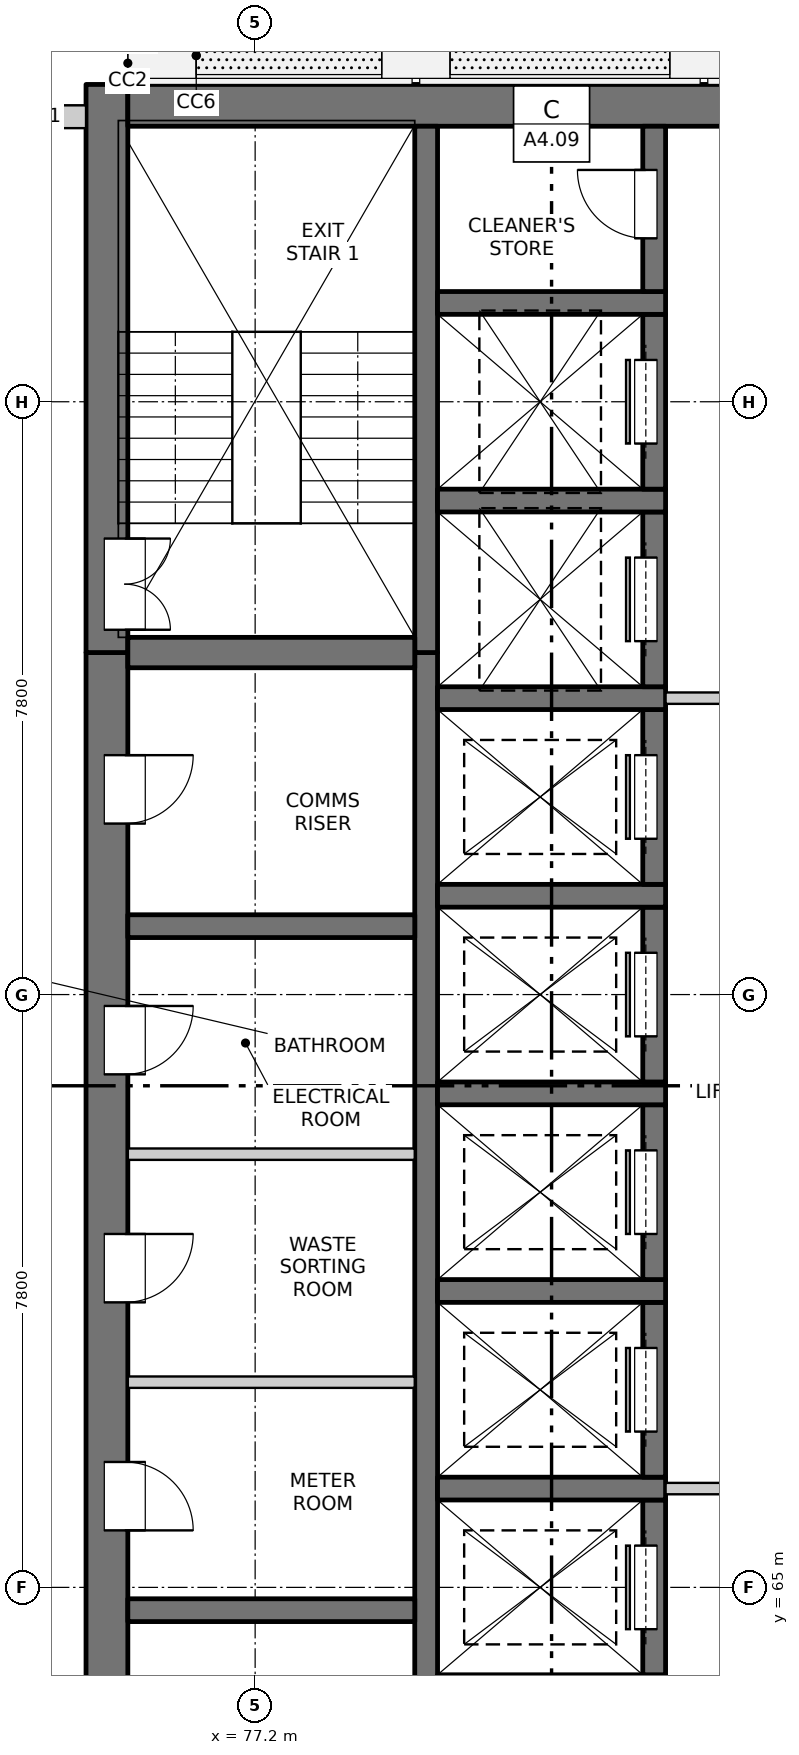
"""IFC4 building model, lengths in metres.
Left out: names, types, materials, properties, quantities, classifications, styles, units other than length and angle.
Written with IfcOpenShell. Run it as: python <this file> out.ifc"""

import sys

from ifc_helpers import new_model, si_unit, direction, frame, frame_2d, origin, place, context, subcontext, project, spatial, rectangle, extrude, element, fill, save


model = new_model("IFC4")
c1 = context("Model", 3, precision=1e-05, world=origin(), true_north=direction((0.0, 1.0)))
c2 = subcontext(c1, "Body", "Model", "MODEL_VIEW")
j1 = project(units=[si_unit("LENGTHUNIT", "METRE"), si_unit("PLANEANGLEUNIT", "RADIAN")], contexts=[c1])
p1 = place(None, origin())
s1 = spatial("IfcSite", under=j1, at=p1, CompositionType="ELEMENT")
p2 = place(p1, origin())
s2 = spatial("IfcBuilding", under=s1, at=p2, CompositionType="ELEMENT")
p3 = place(p2, frame((0.0, 0.0, 127.1)))
s3 = spatial("IfcBuildingStorey", under=s2, at=p3, CompositionType="ELEMENT", Elevation=127.1)
p4 = place(p3, frame((75.25, 54.975, -0.25), z_axis=(0.0, 0.0, 1.0), x_axis=(0.0, 1.0, 0.0)))
e1 = element("IfcWall", 1, at=p4, inside=s3, PredefinedType="SOLIDWALL", context=c2, shape_type="SweptSolid", body=[
    extrude(rectangle(XDim=22.325, YDim=0.55, at=frame_2d((11.163, 0.0))), origin(), (0.0, 0.0, 1.0), 3.4),
])
p5 = place(p4, frame((7.475, 0.0, 0.25)))
e2 = element("IfcOpeningElement", 2, at=p5, cuts=e1, PredefinedType="OPENING", context=c2, shape_type="SweptSolid", body=[
    extrude(rectangle(XDim=0.9, YDim=2.1, at=frame_2d((0.45, 1.05))), frame((0.0, 0.285, 0.0), z_axis=(0.0, -1.0, 0.0), x_axis=(1.0, 0.0, 0.0)), (0.0, 0.0, 1.0), 0.57),
])
p6 = place(p4, frame((10.775, 0.0, 0.25)))
e3 = element("IfcOpeningElement", 3, at=p6, cuts=e1, PredefinedType="OPENING", context=c2, shape_type="SweptSolid", body=[
    extrude(rectangle(XDim=0.9, YDim=2.1, at=frame_2d((0.45, 1.05))), frame((0.0, 0.285, 0.0), z_axis=(0.0, -1.0, 0.0), x_axis=(1.0, 0.0, 0.0)), (0.0, 0.0, 1.0), 0.57),
])
p7 = place(p4, frame((13.775, 0.0, 0.25)))
e4 = element("IfcOpeningElement", 4, at=p7, cuts=e1, PredefinedType="OPENING", context=c2, shape_type="SweptSolid", body=[
    extrude(rectangle(XDim=0.9, YDim=2.1, at=frame_2d((0.45, 1.05))), frame((0.0, 0.285, 0.0), z_axis=(0.0, -1.0, 0.0), x_axis=(1.0, 0.0, 0.0)), (0.0, 0.0, 1.0), 0.57),
])
p8 = place(p4, frame((16.775, 0.0, 0.25)))
e5 = element("IfcOpeningElement", 5, at=p8, cuts=e1, PredefinedType="OPENING", context=c2, shape_type="SweptSolid", body=[
    extrude(rectangle(XDim=0.9, YDim=2.1, at=frame_2d((0.45, 1.05))), frame((0.0, 0.285, 0.0), z_axis=(0.0, -1.0, 0.0), x_axis=(1.0, 0.0, 0.0)), (0.0, 0.0, 1.0), 0.57),
])
p9 = place(p4, frame((20.075, 0.0, 0.25)))
e6 = element("IfcOpeningElement", 6, at=p9, cuts=e1, PredefinedType="OPENING", context=c2, shape_type="SweptSolid", body=[
    extrude(rectangle(XDim=0.9, YDim=2.1, at=frame_2d((0.45, 1.05))), frame((0.0, 0.285, 0.0), z_axis=(0.0, -1.0, 0.0), x_axis=(1.0, 0.0, 0.0)), (0.0, 0.0, 1.0), 0.57),
])
p10 = place(p3, frame((75.25, 77.3, -0.25), z_axis=(0.0, 0.0, 1.0), x_axis=(0.0, 1.0, 0.0)))
e7 = element("IfcWall", 7, at=p10, inside=s3, PredefinedType="SOLIDWALL", context=c2, shape_type="SweptSolid", body=[
    extrude(rectangle(XDim=7.475, YDim=0.55, at=frame_2d((3.737, 0.0))), origin(), (0.0, 0.0, 1.0), 3.4),
])
p11 = place(p10, frame((0.3, 0.0, 0.25)))
e8 = element("IfcOpeningElement", 8, at=p11, cuts=e7, PredefinedType="OPENING", context=c2, shape_type="SweptSolid", body=[
    extrude(rectangle(XDim=1.2, YDim=2.1, at=frame_2d((0.6, 1.05))), frame((0.0, 0.285, 0.0), z_axis=(0.0, -1.0, 0.0), x_axis=(1.0, 0.0, 0.0)), (0.0, 0.0, 1.0), 0.57),
])
p12 = place(p3, frame((75.525, 84.5, -0.25), z_axis=(0.0, 0.0, 1.0), x_axis=(1.0, 0.0, 0.0)))
e9 = element("IfcWall", 9, at=p12, inside=s3, PredefinedType="SOLIDWALL", context=c2, shape_type="SweptSolid", body=[
    extrude(rectangle(XDim=18.95, YDim=0.55, at=frame_2d((9.475, 0.0))), origin(), (0.0, 0.0, 1.0), 3.4),
])
p13 = place(p3, frame((79.45, 60.95, -0.25), z_axis=(0.0, 0.0, 1.0), x_axis=(0.0, 1.0, 0.0)))
e10 = element("IfcWall", 10, at=p13, inside=s3, PredefinedType="SOLIDWALL", context=c2, shape_type="SweptSolid", body=[
    extrude(rectangle(XDim=16.35, YDim=0.3, at=frame_2d((8.175, 0.0))), origin(), (0.0, 0.0, 1.0), 3.4),
])
p14 = place(p3, frame((79.45, 77.3, -0.25), z_axis=(0.0, 0.0, 1.0), x_axis=(0.0, 1.0, 0.0)))
e11 = element("IfcWall", 11, at=p14, inside=s3, PredefinedType="SOLIDWALL", context=c2, shape_type="SweptSolid", body=[
    extrude(rectangle(XDim=6.925, YDim=0.3, at=frame_2d((3.462, 0.0))), origin(), (0.0, 0.0, 1.0), 3.4),
])
p15 = place(p3, frame((82.45, 63.85, -0.25), z_axis=(0.0, 0.0, 1.0), x_axis=(0.0, 1.0, 0.0)))
e12 = element("IfcWall", 12, at=p15, inside=s3, PredefinedType="SOLIDWALL", context=c2, shape_type="SweptSolid", body=[
    extrude(rectangle(XDim=2.3, YDim=0.3, at=frame_2d((1.15, 0.0))), origin(), (0.0, 0.0, 1.0), 3.4),
])
p16 = place(p15, frame((0.6, 0.0, 0.25)))
e13 = element("IfcOpeningElement", 13, at=p16, cuts=e12, PredefinedType="OPENING", context=c2, shape_type="SweptSolid", body=[
    extrude(rectangle(XDim=1.1, YDim=2.1, at=frame_2d((0.55, 1.05))), frame((0.0, 0.16, 0.0), z_axis=(0.0, -1.0, 0.0), x_axis=(1.0, 0.0, 0.0)), (0.0, 0.0, 1.0), 0.32),
])
p17 = place(p3, frame((79.6, 66.3, -0.25), z_axis=(0.0, 0.0, 1.0), x_axis=(1.0, 0.0, 0.0)))
e14 = element("IfcWall", 14, at=p17, inside=s3, PredefinedType="SOLIDWALL", context=c2, shape_type="SweptSolid", body=[
    extrude(rectangle(XDim=3.0, YDim=0.3, at=frame_2d((1.5, 0.0))), origin(), (0.0, 0.0, 1.0), 3.4),
])
p18 = place(p3, frame((82.45, 66.45, -0.25), z_axis=(0.0, 0.0, 1.0), x_axis=(0.0, 1.0, 0.0)))
e15 = element("IfcWall", 15, at=p18, inside=s3, PredefinedType="SOLIDWALL", context=c2, shape_type="SweptSolid", body=[
    extrude(rectangle(XDim=2.3, YDim=0.3, at=frame_2d((1.15, 0.0))), origin(), (0.0, 0.0, 1.0), 3.4),
])
p19 = place(p18, frame((0.6, 0.0, 0.25)))
e16 = element("IfcOpeningElement", 16, at=p19, cuts=e15, PredefinedType="OPENING", context=c2, shape_type="SweptSolid", body=[
    extrude(rectangle(XDim=1.1, YDim=2.1, at=frame_2d((0.55, 1.05))), frame((0.0, 0.16, 0.0), z_axis=(0.0, -1.0, 0.0), x_axis=(1.0, 0.0, 0.0)), (0.0, 0.0, 1.0), 0.32),
])
p20 = place(p3, frame((79.6, 68.9, -0.25), z_axis=(0.0, 0.0, 1.0), x_axis=(1.0, 0.0, 0.0)))
e17 = element("IfcWall", 17, at=p20, inside=s3, PredefinedType="SOLIDWALL", context=c2, shape_type="SweptSolid", body=[
    extrude(rectangle(XDim=3.0, YDim=0.3, at=frame_2d((1.5, 0.0))), origin(), (0.0, 0.0, 1.0), 3.4),
])
p21 = place(p3, frame((82.45, 69.05, -0.25), z_axis=(0.0, 0.0, 1.0), x_axis=(0.0, 1.0, 0.0)))
e18 = element("IfcWall", 18, at=p21, inside=s3, PredefinedType="SOLIDWALL", context=c2, shape_type="SweptSolid", body=[
    extrude(rectangle(XDim=2.3, YDim=0.3, at=frame_2d((1.15, 0.0))), origin(), (0.0, 0.0, 1.0), 3.4),
])
p22 = place(p21, frame((0.6, 0.0, 0.25)))
e19 = element("IfcOpeningElement", 19, at=p22, cuts=e18, PredefinedType="OPENING", context=c2, shape_type="SweptSolid", body=[
    extrude(rectangle(XDim=1.1, YDim=2.1, at=frame_2d((0.55, 1.05))), frame((0.0, 0.16, 0.0), z_axis=(0.0, -1.0, 0.0), x_axis=(1.0, 0.0, 0.0)), (0.0, 0.0, 1.0), 0.32),
])
p23 = place(p3, frame((79.6, 71.5, -0.25), z_axis=(0.0, 0.0, 1.0), x_axis=(1.0, 0.0, 0.0)))
e20 = element("IfcWall", 20, at=p23, inside=s3, PredefinedType="SOLIDWALL", context=c2, shape_type="SweptSolid", body=[
    extrude(rectangle(XDim=3.0, YDim=0.3, at=frame_2d((1.5, 0.0))), origin(), (0.0, 0.0, 1.0), 3.4),
])
p24 = place(p3, frame((82.45, 71.65, -0.25), z_axis=(0.0, 0.0, 1.0), x_axis=(0.0, 1.0, 0.0)))
e21 = element("IfcWall", 21, at=p24, inside=s3, PredefinedType="SOLIDWALL", context=c2, shape_type="SweptSolid", body=[
    extrude(rectangle(XDim=2.3, YDim=0.3, at=frame_2d((1.15, 0.0))), origin(), (0.0, 0.0, 1.0), 3.4),
])
p25 = place(p24, frame((0.6, 0.0, 0.25)))
e22 = element("IfcOpeningElement", 22, at=p25, cuts=e21, PredefinedType="OPENING", context=c2, shape_type="SweptSolid", body=[
    extrude(rectangle(XDim=1.1, YDim=2.1, at=frame_2d((0.55, 1.05))), frame((0.0, 0.16, 0.0), z_axis=(0.0, -1.0, 0.0), x_axis=(1.0, 0.0, 0.0)), (0.0, 0.0, 1.0), 0.32),
])
p26 = place(p3, frame((79.6, 74.1, -0.25), z_axis=(0.0, 0.0, 1.0), x_axis=(1.0, 0.0, 0.0)))
e23 = element("IfcWall", 23, at=p26, inside=s3, PredefinedType="SOLIDWALL", context=c2, shape_type="SweptSolid", body=[
    extrude(rectangle(XDim=3.0, YDim=0.3, at=frame_2d((1.5, 0.0))), origin(), (0.0, 0.0, 1.0), 3.4),
])
p27 = place(p3, frame((82.45, 74.25, -0.25), z_axis=(0.0, 0.0, 1.0), x_axis=(0.0, 1.0, 0.0)))
e24 = element("IfcWall", 24, at=p27, inside=s3, PredefinedType="SOLIDWALL", context=c2, shape_type="SweptSolid", body=[
    extrude(rectangle(XDim=2.3, YDim=0.3, at=frame_2d((1.15, 0.0))), origin(), (0.0, 0.0, 1.0), 3.4),
])
p28 = place(p27, frame((0.6, 0.0, 0.25)))
e25 = element("IfcOpeningElement", 25, at=p28, cuts=e24, PredefinedType="OPENING", context=c2, shape_type="SweptSolid", body=[
    extrude(rectangle(XDim=1.1, YDim=2.1, at=frame_2d((0.55, 1.05))), frame((0.0, 0.16, 0.0), z_axis=(0.0, -1.0, 0.0), x_axis=(1.0, 0.0, 0.0)), (0.0, 0.0, 1.0), 0.32),
])
p29 = place(p3, frame((79.6, 76.7, -0.25), z_axis=(0.0, 0.0, 1.0), x_axis=(1.0, 0.0, 0.0)))
e26 = element("IfcWall", 26, at=p29, inside=s3, PredefinedType="SOLIDWALL", context=c2, shape_type="SweptSolid", body=[
    extrude(rectangle(XDim=3.0, YDim=0.3, at=frame_2d((1.5, 0.0))), origin(), (0.0, 0.0, 1.0), 3.4),
])
p30 = place(p3, frame((82.45, 76.85, -0.25), z_axis=(0.0, 0.0, 1.0), x_axis=(0.0, 1.0, 0.0)))
e27 = element("IfcWall", 27, at=p30, inside=s3, PredefinedType="SOLIDWALL", context=c2, shape_type="SweptSolid", body=[
    extrude(rectangle(XDim=2.3, YDim=0.3, at=frame_2d((1.15, 0.0))), origin(), (0.0, 0.0, 1.0), 3.4),
])
p31 = place(p30, frame((0.6, 0.0, 0.25)))
e28 = element("IfcOpeningElement", 28, at=p31, cuts=e27, PredefinedType="OPENING", context=c2, shape_type="SweptSolid", body=[
    extrude(rectangle(XDim=1.1, YDim=2.1, at=frame_2d((0.55, 1.05))), frame((0.0, 0.16, 0.0), z_axis=(0.0, -1.0, 0.0), x_axis=(1.0, 0.0, 0.0)), (0.0, 0.0, 1.0), 0.32),
])
p32 = place(p3, frame((79.6, 79.3, -0.25), z_axis=(0.0, 0.0, 1.0), x_axis=(1.0, 0.0, 0.0)))
e29 = element("IfcWall", 29, at=p32, inside=s3, PredefinedType="SOLIDWALL", context=c2, shape_type="SweptSolid", body=[
    extrude(rectangle(XDim=3.0, YDim=0.3, at=frame_2d((1.5, 0.0))), origin(), (0.0, 0.0, 1.0), 3.4),
])
p33 = place(p3, frame((82.45, 79.45, -0.25), z_axis=(0.0, 0.0, 1.0), x_axis=(0.0, 1.0, 0.0)))
e30 = element("IfcWall", 30, at=p33, inside=s3, PredefinedType="SOLIDWALL", context=c2, shape_type="SweptSolid", body=[
    extrude(rectangle(XDim=2.3, YDim=0.3, at=frame_2d((1.15, 0.0))), origin(), (0.0, 0.0, 1.0), 3.4),
])
p34 = place(p33, frame((0.6, 0.0, 0.25)))
e31 = element("IfcOpeningElement", 31, at=p34, cuts=e30, PredefinedType="OPENING", context=c2, shape_type="SweptSolid", body=[
    extrude(rectangle(XDim=1.1, YDim=2.1, at=frame_2d((0.55, 1.05))), frame((0.0, 0.16, 0.0), z_axis=(0.0, -1.0, 0.0), x_axis=(1.0, 0.0, 0.0)), (0.0, 0.0, 1.0), 0.32),
])
p35 = place(p3, frame((79.6, 81.9, -0.25), z_axis=(0.0, 0.0, 1.0), x_axis=(1.0, 0.0, 0.0)))
e32 = element("IfcWall", 32, at=p35, inside=s3, PredefinedType="SOLIDWALL", context=c2, shape_type="SweptSolid", body=[
    extrude(rectangle(XDim=3.0, YDim=0.3, at=frame_2d((1.5, 0.0))), origin(), (0.0, 0.0, 1.0), 3.4),
])
p36 = place(p3, frame((82.45, 82.05, -0.25), z_axis=(0.0, 0.0, 1.0), x_axis=(0.0, 1.0, 0.0)))
e33 = element("IfcWall", 33, at=p36, inside=s3, PredefinedType="SOLIDWALL", context=c2, shape_type="SweptSolid", body=[
    extrude(rectangle(XDim=2.175, YDim=0.3, at=frame_2d((1.087, 0.0))), origin(), (0.0, 0.0, 1.0), 3.4),
])
p37 = place(p36, frame((0.7, 0.0, 0.25)))
e34 = element("IfcOpeningElement", 34, at=p37, cuts=e33, PredefinedType="OPENING", context=c2, shape_type="SweptSolid", body=[
    extrude(rectangle(XDim=0.9, YDim=2.1, at=frame_2d((0.45, 1.05))), frame((0.0, 0.16, 0.0), z_axis=(0.0, -1.0, 0.0), x_axis=(1.0, 0.0, 0.0)), (0.0, 0.0, 1.0), 0.32),
])
for number, where, z_axis, x_axis in (
    (35, (75.525, 64.7, -0.25), (0.0, 0.0, 1.0), (1.0, 0.0, 0.0)),
    (36, (75.525, 73.7, -0.25), (0.0, 0.0, 1.0), (1.0, 0.0, 0.0)),
):
    element("IfcWall", number, at=place(p3, frame(where, z_axis=z_axis, x_axis=x_axis)), inside=s3, PredefinedType="SOLIDWALL", context=c2, shape_type="SweptSolid", body=[
        extrude(rectangle(XDim=3.775, YDim=0.3, at=frame_2d((1.888, 0.0))), origin(), (0.0, 0.0, 1.0), 3.4),
    ])
p38 = place(p3, frame((75.525, 77.3, -0.25), z_axis=(0.0, 0.0, 1.0), x_axis=(1.0, 0.0, 0.0)))
e37 = element("IfcWall", 37, at=p38, inside=s3, PredefinedType="SOLIDWALL", context=c2, shape_type="SweptSolid", body=[
    extrude(rectangle(XDim=3.775, YDim=0.4, at=frame_2d((1.888, 0.0))), origin(), (0.0, 0.0, 1.0), 3.4),
])
p39 = place(p3, frame((73.725, 84.35, 0.0), z_axis=(0.0, 0.0, 1.0), x_axis=(1.0, 0.0, 0.0)))
e38 = element("IfcWall", 38, at=p39, inside=s3, PredefinedType="SOLIDWALL", context=c2, shape_type="SweptSolid", body=[
    extrude(rectangle(XDim=1.25, YDim=0.3, at=frame_2d((0.625, 0.0))), origin(), (0.0, 0.0, 1.0), 2.7),
])
p40 = place(p3, frame((82.6, 66.3, 0.0), z_axis=(0.0, 0.0, 1.0), x_axis=(1.0, 0.0, 0.0)))
e39 = element("IfcWall", 39, at=p40, inside=s3, PredefinedType="PARTITIONING", context=c2, shape_type="SweptSolid", body=[
    extrude(rectangle(XDim=4.8, YDim=0.15, at=frame_2d((2.4, 0.0))), origin(), (0.0, 0.0, 1.0), 3.15),
])
p41 = place(p40, frame((1.5, 0.0, 0.0)))
e40 = element("IfcOpeningElement", 40, at=p41, cuts=e39, PredefinedType="OPENING", context=c2, shape_type="SweptSolid", body=[
    extrude(rectangle(XDim=1.8, YDim=2.1, at=frame_2d((0.9, 1.05))), frame((0.0, 0.085, 0.0), z_axis=(0.0, -1.0, 0.0), x_axis=(1.0, 0.0, 0.0)), (0.0, 0.0, 1.0), 0.17),
])
for number, where, z_axis, x_axis in (
    (41, (75.525, 67.7, 0.0), (0.0, 0.0, 1.0), (1.0, 0.0, 0.0)),
    (42, (75.525, 70.7, 0.0), (0.0, 0.0, 1.0), (1.0, 0.0, 0.0)),
):
    element("IfcWall", number, at=place(p3, frame(where, z_axis=z_axis, x_axis=x_axis)), inside=s3, PredefinedType="PARTITIONING", context=c2, shape_type="SweptSolid", body=[
        extrude(rectangle(XDim=3.775, YDim=0.15, at=frame_2d((1.887, 0.0))), origin(), (0.0, 0.0, 1.0), 3.15),
    ])
p42 = place(p3, frame((82.6, 76.7, 0.0), z_axis=(0.0, 0.0, 1.0), x_axis=(1.0, 0.0, 0.0)))
e43 = element("IfcWall", 43, at=p42, inside=s3, PredefinedType="PARTITIONING", context=c2, shape_type="SweptSolid", body=[
    extrude(rectangle(XDim=4.8, YDim=0.15, at=frame_2d((2.4, 0.0))), origin(), (0.0, 0.0, 1.0), 3.15),
])
p43 = place(p42, frame((1.5, 0.0, 0.0)))
e44 = element("IfcOpeningElement", 44, at=p43, cuts=e43, PredefinedType="OPENING", context=c2, shape_type="SweptSolid", body=[
    extrude(rectangle(XDim=1.8, YDim=2.1, at=frame_2d((0.9, 1.05))), frame((0.0, 0.085, 0.0), z_axis=(0.0, -1.0, 0.0), x_axis=(1.0, 0.0, 0.0)), (0.0, 0.0, 1.0), 0.17),
])
p44 = place(p16, origin())
e45 = element("IfcDoor", 45, at=p44, inside=s3, OperationType="SLIDING_TO_RIGHT", PredefinedType="DOOR", context=c2, shape_type="SweptSolid", body=[
    extrude(rectangle(XDim=1.1, YDim=2.1, at=frame_2d((0.55, 1.05))), frame((0.0, 0.135, 0.0), z_axis=(0.0, -1.0, 0.0), x_axis=(1.0, 0.0, 0.0)), (0.0, 0.0, 1.0), 0.05),
])
fill(e13, e45)
p45 = place(p6, origin())
e46 = element("IfcDoor", 46, at=p45, inside=s3, OperationType="SINGLE_SWING_RIGHT", PredefinedType="DOOR", context=c2, shape_type="SweptSolid", body=[
    extrude(rectangle(XDim=0.9, YDim=2.1, at=frame_2d((0.45, 1.05))), frame((0.0, -0.21, 0.0), z_axis=(0.0, -1.0, 0.0), x_axis=(1.0, 0.0, 0.0)), (0.0, 0.0, 1.0), 0.05),
])
fill(e3, e46)
p46 = place(p19, origin())
e47 = element("IfcDoor", 47, at=p46, inside=s3, OperationType="SLIDING_TO_RIGHT", PredefinedType="DOOR", context=c2, shape_type="SweptSolid", body=[
    extrude(rectangle(XDim=1.1, YDim=2.1, at=frame_2d((0.55, 1.05))), frame((0.0, 0.135, 0.0), z_axis=(0.0, -1.0, 0.0), x_axis=(1.0, 0.0, 0.0)), (0.0, 0.0, 1.0), 0.05),
])
fill(e16, e47)
p47 = place(p7, origin())
e48 = element("IfcDoor", 48, at=p47, inside=s3, OperationType="SINGLE_SWING_LEFT", PredefinedType="DOOR", context=c2, shape_type="SweptSolid", body=[
    extrude(rectangle(XDim=0.9, YDim=2.1, at=frame_2d((0.45, 1.05))), frame((0.0, -0.21, 0.0), z_axis=(0.0, -1.0, 0.0), x_axis=(1.0, 0.0, 0.0)), (0.0, 0.0, 1.0), 0.05),
])
fill(e4, e48)
p48 = place(p22, origin())
e49 = element("IfcDoor", 49, at=p48, inside=s3, OperationType="SLIDING_TO_LEFT", PredefinedType="DOOR", context=c2, shape_type="SweptSolid", body=[
    extrude(rectangle(XDim=1.1, YDim=2.1, at=frame_2d((0.55, 1.05))), frame((0.0, 0.135, 0.0), z_axis=(0.0, -1.0, 0.0), x_axis=(1.0, 0.0, 0.0)), (0.0, 0.0, 1.0), 0.05),
])
fill(e19, e49)
p49 = place(p8, origin())
e50 = element("IfcDoor", 50, at=p49, inside=s3, OperationType="SINGLE_SWING_LEFT", PredefinedType="DOOR", context=c2, shape_type="SweptSolid", body=[
    extrude(rectangle(XDim=0.9, YDim=2.1, at=frame_2d((0.45, 1.05))), frame((0.0, -0.21, 0.0), z_axis=(0.0, -1.0, 0.0), x_axis=(1.0, 0.0, 0.0)), (0.0, 0.0, 1.0), 0.05),
])
fill(e5, e50)
p50 = place(p25, origin())
e51 = element("IfcDoor", 51, at=p50, inside=s3, OperationType="SLIDING_TO_LEFT", PredefinedType="DOOR", context=c2, shape_type="SweptSolid", body=[
    extrude(rectangle(XDim=1.1, YDim=2.1, at=frame_2d((0.55, 1.05))), frame((0.0, 0.135, 0.0), z_axis=(0.0, -1.0, 0.0), x_axis=(1.0, 0.0, 0.0)), (0.0, 0.0, 1.0), 0.05),
])
fill(e22, e51)
p51 = place(p28, origin())
e52 = element("IfcDoor", 52, at=p51, inside=s3, OperationType="SLIDING_TO_LEFT", PredefinedType="DOOR", context=c2, shape_type="SweptSolid", body=[
    extrude(rectangle(XDim=1.1, YDim=2.1, at=frame_2d((0.55, 1.05))), frame((0.0, 0.135, 0.0), z_axis=(0.0, -1.0, 0.0), x_axis=(1.0, 0.0, 0.0)), (0.0, 0.0, 1.0), 0.05),
])
fill(e25, e52)
p52 = place(p9, origin())
e53 = element("IfcDoor", 53, at=p52, inside=s3, OperationType="SINGLE_SWING_LEFT", PredefinedType="DOOR", context=c2, shape_type="SweptSolid", body=[
    extrude(rectangle(XDim=0.9, YDim=2.1, at=frame_2d((0.45, 1.05))), frame((0.0, -0.21, 0.0), z_axis=(0.0, -1.0, 0.0), x_axis=(1.0, 0.0, 0.0)), (0.0, 0.0, 1.0), 0.05),
])
fill(e6, e53)
p53 = place(p31, origin())
e54 = element("IfcDoor", 54, at=p53, inside=s3, OperationType="SLIDING_TO_LEFT", PredefinedType="DOOR", context=c2, shape_type="SweptSolid", body=[
    extrude(rectangle(XDim=1.1, YDim=2.1, at=frame_2d((0.55, 1.05))), frame((0.0, 0.135, 0.0), z_axis=(0.0, -1.0, 0.0), x_axis=(1.0, 0.0, 0.0)), (0.0, 0.0, 1.0), 0.05),
])
fill(e28, e54)
p54 = place(p11, origin())
e55 = element("IfcDoor", 55, at=p54, inside=s3, OperationType="DOUBLE_DOOR_SINGLE_SWING", PredefinedType="DOOR", context=c2, shape_type="SweptSolid", body=[
    extrude(rectangle(XDim=1.2, YDim=2.1, at=frame_2d((0.6, 1.05))), frame((0.0, -0.21, 0.0), z_axis=(0.0, -1.0, 0.0), x_axis=(1.0, 0.0, 0.0)), (0.0, 0.0, 1.0), 0.05),
])
fill(e8, e55)
p55 = place(p34, origin())
e56 = element("IfcDoor", 56, at=p55, inside=s3, OperationType="SLIDING_TO_LEFT", PredefinedType="DOOR", context=c2, shape_type="SweptSolid", body=[
    extrude(rectangle(XDim=1.1, YDim=2.1, at=frame_2d((0.55, 1.05))), frame((0.0, 0.135, 0.0), z_axis=(0.0, -1.0, 0.0), x_axis=(1.0, 0.0, 0.0)), (0.0, 0.0, 1.0), 0.05),
])
fill(e31, e56)
p56 = place(p37, origin())
e57 = element("IfcDoor", 57, at=p56, inside=s3, OperationType="SINGLE_SWING_RIGHT", PredefinedType="DOOR", context=c2, shape_type="SweptSolid", body=[
    extrude(rectangle(XDim=0.9, YDim=2.1, at=frame_2d((0.45, 1.05))), frame((0.0, 0.135, 0.0), z_axis=(0.0, -1.0, 0.0), x_axis=(1.0, 0.0, 0.0)), (0.0, 0.0, 1.0), 0.05),
])
fill(e34, e57)
save(model, sys.argv[1])
